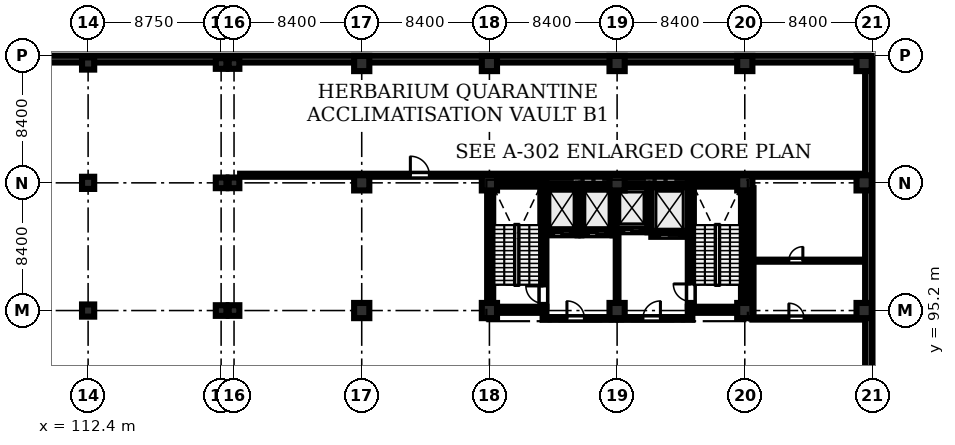
"""IFC4 building model, lengths in metres.
Left out: names, types, materials, properties, quantities, classifications, styles, units other than length and angle.
Written with IfcOpenShell. Run it as: python <this file> out.ifc"""

import sys

from ifc_helpers import new_model, si_unit, direction, frame, frame_2d, origin, origin_2d, place, context, subcontext, project, spatial, rectangle, extrude, element, fill, save


model = new_model("IFC4")
c1 = context("Model", 3, precision=1e-05, world=origin(), true_north=direction((0.0, 1.0)))
c2 = subcontext(c1, "Body", "Model", "MODEL_VIEW")
j1 = project(units=[si_unit("LENGTHUNIT", "METRE"), si_unit("PLANEANGLEUNIT", "RADIAN")], contexts=[c1])
p1 = place(None, origin())
s1 = spatial("IfcSite", under=j1, at=p1, CompositionType="ELEMENT")
p2 = place(p1, origin())
s2 = spatial("IfcBuilding", under=s1, at=p2, CompositionType="ELEMENT")
p3 = place(p2, frame((0.0, 0.0, -4.8)))
s3 = spatial("IfcBuildingStorey", under=s2, at=p3, CompositionType="ELEMENT", Elevation=-4.8)
for number, where, z_axis, x_axis in (
    (1, (112.4, 95.2, 0.0), (0.0, 0.0, 1.0), (1.0, 0.0, 0.0)),
    (2, (112.4, 103.6, 0.0), (0.0, 0.0, 1.0), (1.0, 0.0, 0.0)),
    (3, (112.4, 111.45, 0.0), (0.0, 0.0, 1.0), (1.0, 0.0, 0.0)),
):
    element("IfcColumn", number, at=place(p3, frame(where, z_axis=z_axis, x_axis=x_axis)), inside=s3, PredefinedType="COLUMN", context=c2, shape_type="SweptSolid", body=[
        extrude(rectangle(XDim=0.8, YDim=0.8, at=origin_2d()), origin(), (0.0, 0.0, 1.0), 4.395),
    ])
for number, where, z_axis, x_axis in (
    (4, (121.15, 95.2, 0.0), (0.0, 0.0, 1.0), (1.0, 0.0, 0.0)),
    (5, (121.15, 103.6, 0.0), (0.0, 0.0, 1.0), (1.0, 0.0, 0.0)),
    (6, (121.15, 111.45, 0.0), (0.0, 0.0, 1.0), (1.0, 0.0, 0.0)),
    (7, (122.0, 95.2, 0.0), (0.0, 0.0, 1.0), (1.0, 0.0, 0.0)),
    (8, (122.0, 103.6, 0.0), (0.0, 0.0, 1.0), (1.0, 0.0, 0.0)),
    (9, (122.0, 111.45, 0.0), (0.0, 0.0, 1.0), (1.0, 0.0, 0.0)),
):
    element("IfcColumn", number, at=place(p3, frame(where, z_axis=z_axis, x_axis=x_axis)), inside=s3, PredefinedType="COLUMN", context=c2, shape_type="SweptSolid", body=[
        extrude(rectangle(XDim=0.7, YDim=0.7, at=origin_2d()), origin(), (0.0, 0.0, 1.0), 4.395),
    ])
for number, where, z_axis, x_axis in (
    (10, (130.4, 95.2, 0.0), (0.0, 0.0, 1.0), (1.0, 0.0, 0.0)),
    (11, (130.4, 103.6, 0.0), (0.0, 0.0, 1.0), (1.0, 0.0, 0.0)),
    (12, (130.4, 111.45, 0.0), (0.0, 0.0, 1.0), (1.0, 0.0, 0.0)),
    (13, (138.8, 95.2, 0.0), (0.0, 0.0, 1.0), (1.0, 0.0, 0.0)),
    (14, (138.8, 103.6, 0.0), (0.0, 0.0, 1.0), (1.0, 0.0, 0.0)),
    (15, (138.8, 111.45, 0.0), (0.0, 0.0, 1.0), (1.0, 0.0, 0.0)),
    (16, (147.2, 95.2, 0.0), (0.0, 0.0, 1.0), (1.0, 0.0, 0.0)),
    (17, (147.2, 103.6, 0.0), (0.0, 0.0, 1.0), (1.0, 0.0, 0.0)),
    (18, (147.2, 111.45, 0.0), (0.0, 0.0, 1.0), (1.0, 0.0, 0.0)),
    (19, (155.6, 95.2, 0.0), (0.0, 0.0, 1.0), (1.0, 0.0, 0.0)),
    (20, (155.6, 103.6, 0.0), (0.0, 0.0, 1.0), (1.0, 0.0, 0.0)),
    (21, (155.6, 111.45, 0.0), (0.0, 0.0, 1.0), (1.0, 0.0, 0.0)),
    (22, (163.45, 95.2, 0.0), (0.0, 0.0, 1.0), (1.0, 0.0, 0.0)),
    (23, (163.45, 103.6, 0.0), (0.0, 0.0, 1.0), (1.0, 0.0, 0.0)),
    (24, (163.45, 111.45, 0.0), (0.0, 0.0, 1.0), (1.0, 0.0, 0.0)),
):
    element("IfcColumn", number, at=place(p3, frame(where, z_axis=z_axis, x_axis=x_axis)), inside=s3, PredefinedType="COLUMN", context=c2, shape_type="SweptSolid", body=[
        extrude(rectangle(XDim=1.0, YDim=1.0, at=origin_2d()), origin(), (0.0, 0.0, 1.0), 4.395),
    ])
p4 = place(p3, frame((163.74, 0.26, 0.0), z_axis=(0.0, 0.0, 1.0), x_axis=(0.0, 1.0, 0.0)))
e25 = element("IfcWall", 25, at=p4, inside=s3, PredefinedType="SHEAR", context=c2, shape_type="SweptSolid", body=[
    extrude(rectangle(XDim=111.48, YDim=0.45, at=frame_2d((55.74, 0.0))), origin(), (0.0, 0.0, 1.0), 3.75),
])
p5 = place(p3, frame((163.74, 111.74, 0.0), z_axis=(0.0, 0.0, 1.0), x_axis=(-1.0, 0.0, 0.0)))
e26 = element("IfcWall", 26, at=p5, inside=s3, PredefinedType="SHEAR", context=c2, shape_type="SweptSolid", body=[
    extrude(rectangle(XDim=163.48, YDim=0.45, at=frame_2d((81.74, 0.0))), origin(), (0.0, 0.0, 1.0), 3.75),
])
for number, where, z_axis, x_axis in (
    (27, (138.65, 95.25, 0.0), (0.0, 0.0, 1.0), (1.0, 0.0, 0.0)),
    (28, (138.65, 103.55, 0.0), (0.0, 0.0, 1.0), (1.0, 0.0, 0.0)),
):
    element("IfcWall", number, at=place(p3, frame(where, z_axis=z_axis, x_axis=x_axis)), inside=s3, PredefinedType="SHEAR", context=c2, shape_type="SweptSolid", body=[
        extrude(rectangle(XDim=3.9, YDim=0.4, at=frame_2d((1.95, 0.0))), origin(), (0.0, 0.0, 1.0), 4.395),
    ])
p6 = place(p3, frame((138.85, 95.45, 0.0), z_axis=(0.0, 0.0, 1.0), x_axis=(0.0, 1.0, 0.0)))
e29 = element("IfcWall", 29, at=p6, inside=s3, PredefinedType="SHEAR", context=c2, shape_type="SweptSolid", body=[
    extrude(rectangle(XDim=7.9, YDim=0.4, at=frame_2d((3.95, 0.0))), origin(), (0.0, 0.0, 1.0), 4.395),
])
p7 = place(p3, frame((142.35, 95.45, 0.0), z_axis=(0.0, 0.0, 1.0), x_axis=(0.0, 1.0, 0.0)))
e30 = element("IfcWall", 30, at=p7, inside=s3, PredefinedType="SHEAR", context=c2, shape_type="SweptSolid", body=[
    extrude(rectangle(XDim=7.9, YDim=0.4, at=frame_2d((3.95, 0.0))), origin(), (0.0, 0.0, 1.0), 4.395),
])
p8 = place(p7, frame((0.22, 0.0, 0.0)))
e31 = element("IfcOpeningElement", 31, at=p8, cuts=e30, PredefinedType="OPENING", context=c2, shape_type="SweptSolid", body=[
    extrude(rectangle(XDim=1.15, YDim=2.15, at=frame_2d((0.575, 1.075))), frame((0.0, 0.21, 0.0), z_axis=(0.0, -1.0, 0.0), x_axis=(1.0, 0.0, 0.0)), (0.0, 0.0, 1.0), 0.42),
])
for number, where, z_axis, x_axis in (
    (32, (151.85, 95.25, 0.0), (0.0, 0.0, 1.0), (1.0, 0.0, 0.0)),
    (33, (151.85, 103.55, 0.0), (0.0, 0.0, 1.0), (1.0, 0.0, 0.0)),
):
    element("IfcWall", number, at=place(p3, frame(where, z_axis=z_axis, x_axis=x_axis)), inside=s3, PredefinedType="SHEAR", context=c2, shape_type="SweptSolid", body=[
        extrude(rectangle(XDim=3.9, YDim=0.4, at=frame_2d((1.95, 0.0))), origin(), (0.0, 0.0, 1.0), 4.395),
    ])
p9 = place(p3, frame((152.05, 95.45, 0.0), z_axis=(0.0, 0.0, 1.0), x_axis=(0.0, 1.0, 0.0)))
e34 = element("IfcWall", 34, at=p9, inside=s3, PredefinedType="SHEAR", context=c2, shape_type="SweptSolid", body=[
    extrude(rectangle(XDim=7.9, YDim=0.4, at=frame_2d((3.95, 0.0))), origin(), (0.0, 0.0, 1.0), 4.395),
])
p10 = place(p9, frame((0.35, 0.0, 0.0)))
e35 = element("IfcOpeningElement", 35, at=p10, cuts=e34, PredefinedType="OPENING", context=c2, shape_type="SweptSolid", body=[
    extrude(rectangle(XDim=1.15, YDim=2.15, at=frame_2d((0.575, 1.075))), frame((0.0, 0.21, 0.0), z_axis=(0.0, -1.0, 0.0), x_axis=(1.0, 0.0, 0.0)), (0.0, 0.0, 1.0), 0.42),
])
p11 = place(p3, frame((155.55, 95.45, 0.0), z_axis=(0.0, 0.0, 1.0), x_axis=(0.0, 1.0, 0.0)))
e36 = element("IfcWall", 36, at=p11, inside=s3, PredefinedType="SHEAR", context=c2, shape_type="SweptSolid", body=[
    extrude(rectangle(XDim=7.9, YDim=0.4, at=frame_2d((3.95, 0.0))), origin(), (0.0, 0.0, 1.0), 4.395),
])
p12 = place(p3, frame((142.55, 100.275, 0.0), z_axis=(0.0, 0.0, 1.0), x_axis=(1.0, 0.0, 0.0)))
e37 = element("IfcWall", 37, at=p12, inside=s3, PredefinedType="SHEAR", context=c2, shape_type="SweptSolid", body=[
    extrude(rectangle(XDim=2.05, YDim=0.25, at=frame_2d((1.025, 0.0))), origin(), (0.0, 0.0, 1.0), 4.395),
])
p13 = place(p12, frame((0.475, 0.0, 0.0)))
e38 = element("IfcOpeningElement", 38, at=p13, cuts=e37, PredefinedType="OPENING", context=c2, shape_type="SweptSolid", body=[
    extrude(rectangle(XDim=1.1, YDim=2.15, at=frame_2d((0.55, 1.075))), frame((0.0, 0.135, 0.0), z_axis=(0.0, -1.0, 0.0), x_axis=(1.0, 0.0, 0.0)), (0.0, 0.0, 1.0), 0.27),
])
p14 = place(p3, frame((142.55, 103.425, 0.0), z_axis=(0.0, 0.0, 1.0), x_axis=(1.0, 0.0, 0.0)))
e39 = element("IfcWall", 39, at=p14, inside=s3, PredefinedType="SHEAR", context=c2, shape_type="SweptSolid", body=[
    extrude(rectangle(XDim=2.05, YDim=0.25, at=frame_2d((1.025, 0.0))), origin(), (0.0, 0.0, 1.0), 4.395),
])
p15 = place(p3, frame((144.725, 100.15, 0.0), z_axis=(0.0, 0.0, 1.0), x_axis=(0.0, 1.0, 0.0)))
e40 = element("IfcWall", 40, at=p15, inside=s3, PredefinedType="SHEAR", context=c2, shape_type="SweptSolid", body=[
    extrude(rectangle(XDim=3.4, YDim=0.25, at=frame_2d((1.7, 0.0))), origin(), (0.0, 0.0, 1.0), 4.395),
])
p16 = place(p3, frame((144.85, 100.275, 0.0), z_axis=(0.0, 0.0, 1.0), x_axis=(1.0, 0.0, 0.0)))
e41 = element("IfcWall", 41, at=p16, inside=s3, PredefinedType="SHEAR", context=c2, shape_type="SweptSolid", body=[
    extrude(rectangle(XDim=2.05, YDim=0.25, at=frame_2d((1.025, 0.0))), origin(), (0.0, 0.0, 1.0), 4.395),
])
p17 = place(p16, frame((0.465, 0.0, 0.0)))
e42 = element("IfcOpeningElement", 42, at=p17, cuts=e41, PredefinedType="OPENING", context=c2, shape_type="SweptSolid", body=[
    extrude(rectangle(XDim=1.12, YDim=2.15, at=frame_2d((0.56, 1.075))), frame((0.0, 0.135, 0.0), z_axis=(0.0, -1.0, 0.0), x_axis=(1.0, 0.0, 0.0)), (0.0, 0.0, 1.0), 0.27),
])
p18 = place(p3, frame((144.85, 103.425, 0.0), z_axis=(0.0, 0.0, 1.0), x_axis=(1.0, 0.0, 0.0)))
e43 = element("IfcWall", 43, at=p18, inside=s3, PredefinedType="SHEAR", context=c2, shape_type="SweptSolid", body=[
    extrude(rectangle(XDim=2.05, YDim=0.25, at=frame_2d((1.025, 0.0))), origin(), (0.0, 0.0, 1.0), 4.395),
])
p19 = place(p3, frame((147.025, 100.15, 0.0), z_axis=(0.0, 0.0, 1.0), x_axis=(0.0, 1.0, 0.0)))
e44 = element("IfcWall", 44, at=p19, inside=s3, PredefinedType="SHEAR", context=c2, shape_type="SweptSolid", body=[
    extrude(rectangle(XDim=3.4, YDim=0.25, at=frame_2d((1.7, 0.0))), origin(), (0.0, 0.0, 1.0), 4.395),
])
p20 = place(p3, frame((147.15, 100.475, 0.0), z_axis=(0.0, 0.0, 1.0), x_axis=(1.0, 0.0, 0.0)))
e45 = element("IfcWall", 45, at=p20, inside=s3, PredefinedType="SHEAR", context=c2, shape_type="SweptSolid", body=[
    extrude(rectangle(XDim=2.05, YDim=0.25, at=frame_2d((1.025, 0.0))), origin(), (0.0, 0.0, 1.0), 4.395),
])
p21 = place(p20, frame((0.495, 0.0, 0.0)))
e46 = element("IfcOpeningElement", 46, at=p21, cuts=e45, PredefinedType="OPENING", context=c2, shape_type="SweptSolid", body=[
    extrude(rectangle(XDim=1.06, YDim=2.15, at=frame_2d((0.53, 1.075))), frame((0.0, 0.135, 0.0), z_axis=(0.0, -1.0, 0.0), x_axis=(1.0, 0.0, 0.0)), (0.0, 0.0, 1.0), 0.27),
])
p22 = place(p3, frame((147.15, 103.425, 0.0), z_axis=(0.0, 0.0, 1.0), x_axis=(1.0, 0.0, 0.0)))
e47 = element("IfcWall", 47, at=p22, inside=s3, PredefinedType="SHEAR", context=c2, shape_type="SweptSolid", body=[
    extrude(rectangle(XDim=2.05, YDim=0.25, at=frame_2d((1.025, 0.0))), origin(), (0.0, 0.0, 1.0), 4.395),
])
p23 = place(p3, frame((149.325, 100.35, 0.0), z_axis=(0.0, 0.0, 1.0), x_axis=(0.0, 1.0, 0.0)))
e48 = element("IfcWall", 48, at=p23, inside=s3, PredefinedType="SHEAR", context=c2, shape_type="SweptSolid", body=[
    extrude(rectangle(XDim=3.2, YDim=0.25, at=frame_2d((1.6, 0.0))), origin(), (0.0, 0.0, 1.0), 4.395),
])
p24 = place(p3, frame((149.45, 100.175, 0.0), z_axis=(0.0, 0.0, 1.0), x_axis=(1.0, 0.0, 0.0)))
e49 = element("IfcWall", 49, at=p24, inside=s3, PredefinedType="SHEAR", context=c2, shape_type="SweptSolid", body=[
    extrude(rectangle(XDim=2.4, YDim=0.25, at=frame_2d((1.2, 0.0))), origin(), (0.0, 0.0, 1.0), 4.395),
])
p25 = place(p24, frame((0.55, 0.0, 0.0)))
e50 = element("IfcOpeningElement", 50, at=p25, cuts=e49, PredefinedType="OPENING", context=c2, shape_type="SweptSolid", body=[
    extrude(rectangle(XDim=1.3, YDim=2.25, at=frame_2d((0.65, 1.125))), frame((0.0, 0.135, 0.0), z_axis=(0.0, -1.0, 0.0), x_axis=(1.0, 0.0, 0.0)), (0.0, 0.0, 1.0), 0.27),
])
p26 = place(p3, frame((149.45, 103.425, 0.0), z_axis=(0.0, 0.0, 1.0), x_axis=(1.0, 0.0, 0.0)))
e51 = element("IfcWall", 51, at=p26, inside=s3, PredefinedType="SHEAR", context=c2, shape_type="SweptSolid", body=[
    extrude(rectangle(XDim=2.4, YDim=0.25, at=frame_2d((1.2, 0.0))), origin(), (0.0, 0.0, 1.0), 4.395),
])
p27 = place(p3, frame((142.3, 94.68, 0.0), z_axis=(0.0, 0.0, 1.0), x_axis=(1.0, 0.0, 0.0)))
e52 = element("IfcWall", 52, at=p27, inside=s3, PredefinedType="STANDARD", context=c2, shape_type="SweptSolid", body=[
    extrude(rectangle(XDim=4.8, YDim=0.18, at=frame_2d((2.4, 0.0))), origin(), (0.0, 0.0, 1.0), 4.395),
])
p28 = place(p27, frame((1.6, 0.0, 0.0)))
e53 = element("IfcOpeningElement", 53, at=p28, cuts=e52, PredefinedType="OPENING", context=c2, shape_type="SweptSolid", body=[
    extrude(rectangle(XDim=1.15, YDim=2.15, at=frame_2d((0.575, 1.075))), frame((0.0, 0.1, 0.0), z_axis=(0.0, -1.0, 0.0), x_axis=(1.0, 0.0, 0.0)), (0.0, 0.0, 1.0), 0.2),
])
p29 = place(p3, frame((147.3, 94.68, 0.0), z_axis=(0.0, 0.0, 1.0), x_axis=(1.0, 0.0, 0.0)))
e54 = element("IfcWall", 54, at=p29, inside=s3, PredefinedType="STANDARD", context=c2, shape_type="SweptSolid", body=[
    extrude(rectangle(XDim=4.85, YDim=0.18, at=frame_2d((2.425, 0.0))), origin(), (0.0, 0.0, 1.0), 4.395),
])
p30 = place(p29, frame((1.6, 0.0, 0.0)))
e55 = element("IfcOpeningElement", 55, at=p30, cuts=e54, PredefinedType="OPENING", context=c2, shape_type="SweptSolid", body=[
    extrude(rectangle(XDim=1.15, YDim=2.15, at=frame_2d((0.575, 1.075))), frame((0.0, 0.1, 0.0), z_axis=(0.0, -1.0, 0.0), x_axis=(1.0, 0.0, 0.0)), (0.0, 0.0, 1.0), 0.2),
])
p31 = place(p3, frame((147.2, 95.75, 0.0), z_axis=(0.0, 0.0, 1.0), x_axis=(0.0, 1.0, 0.0)))
e56 = element("IfcWall", 56, at=p31, inside=s3, PredefinedType="STANDARD", context=c2, shape_type="SweptSolid", body=[
    extrude(rectangle(XDim=4.5, YDim=0.18, at=frame_2d((2.25, 0.0))), origin(), (0.0, 0.0, 1.0), 3.595),
])
p32 = place(p3, frame((156.1, 94.68, 0.0), z_axis=(0.0, 0.0, 1.0), x_axis=(1.0, 0.0, 0.0)))
e57 = element("IfcWall", 57, at=p32, inside=s3, PredefinedType="PARTITIONING", context=c2, shape_type="SweptSolid", body=[
    extrude(rectangle(XDim=7.35, YDim=0.15, at=frame_2d((3.675, 0.0))), origin(), (0.0, 0.0, 1.0), 4.395),
])
p33 = place(p32, frame((2.4, 0.0, 0.0)))
e58 = element("IfcOpeningElement", 58, at=p33, cuts=e57, PredefinedType="OPENING", context=c2, shape_type="SweptSolid", body=[
    extrude(rectangle(XDim=1.0, YDim=2.12, at=frame_2d((0.5, 1.06))), frame((0.0, 0.085, 0.0), z_axis=(0.0, -1.0, 0.0), x_axis=(1.0, 0.0, 0.0)), (0.0, 0.0, 1.0), 0.17),
])
p34 = place(p3, frame((156.1, 98.48, 0.0), z_axis=(0.0, 0.0, 1.0), x_axis=(1.0, 0.0, 0.0)))
e59 = element("IfcWall", 59, at=p34, inside=s3, PredefinedType="PARTITIONING", context=c2, shape_type="SweptSolid", body=[
    extrude(rectangle(XDim=7.35, YDim=0.135, at=frame_2d((3.675, 0.0))), origin(), (0.0, 0.0, 1.0), 4.395),
])
p35 = place(p34, frame((2.4, 0.0, 0.0)))
e60 = element("IfcOpeningElement", 60, at=p35, cuts=e59, PredefinedType="OPENING", context=c2, shape_type="SweptSolid", body=[
    extrude(rectangle(XDim=0.92, YDim=2.1, at=frame_2d((0.46, 1.05))), frame((0.0, 0.077, 0.0), z_axis=(0.0, -1.0, 0.0), x_axis=(1.0, 0.0, 0.0)), (0.0, 0.0, 1.0), 0.155),
])
p36 = place(p3, frame((156.1, 94.68, 0.0), z_axis=(0.0, 0.0, 1.0), x_axis=(0.0, 1.0, 0.0)))
e61 = element("IfcWall", 61, at=p36, inside=s3, PredefinedType="PARTITIONING", context=c2, shape_type="SweptSolid", body=[
    extrude(rectangle(XDim=8.57, YDim=0.15, at=frame_2d((4.285, 0.0))), origin(), (0.0, 0.0, 1.0), 4.395),
])
p37 = place(p3, frame((122.4, 104.1, 0.0), z_axis=(0.0, 0.0, 1.0), x_axis=(1.0, 0.0, 0.0)))
e62 = element("IfcWall", 62, at=p37, inside=s3, PredefinedType="SOLIDWALL", context=c2, shape_type="SweptSolid", body=[
    extrude(rectangle(XDim=40.8, YDim=0.2, at=frame_2d((20.4, 0.0))), origin(), (0.0, 0.0, 1.0), 4.395),
])
p38 = place(p37, frame((11.2, 0.0, 0.0)))
e63 = element("IfcOpeningElement", 63, at=p38, cuts=e62, PredefinedType="OPENING", context=c2, shape_type="SweptSolid", body=[
    extrude(rectangle(XDim=1.25, YDim=2.2, at=frame_2d((0.625, 1.1))), frame((0.0, 0.11, 0.0), z_axis=(0.0, -1.0, 0.0), x_axis=(1.0, 0.0, 0.0)), (0.0, 0.0, 1.0), 0.22),
])
p39 = place(p28, origin())
e64 = element("IfcDoor", 64, at=p39, inside=s3, OperationType="SINGLE_SWING_LEFT", PredefinedType="DOOR", context=c2, shape_type="SweptSolid", body=[
    extrude(rectangle(XDim=1.15, YDim=2.15, at=frame_2d((0.575, 1.075))), frame((0.0, 0.025, 0.0), z_axis=(0.0, -1.0, 0.0), x_axis=(1.0, 0.0, 0.0)), (0.0, 0.0, 1.0), 0.05),
])
fill(e53, e64)
p40 = place(p30, origin())
e65 = element("IfcDoor", 65, at=p40, inside=s3, OperationType="SINGLE_SWING_RIGHT", PredefinedType="DOOR", context=c2, shape_type="SweptSolid", body=[
    extrude(rectangle(XDim=1.15, YDim=2.15, at=frame_2d((0.575, 1.075))), frame((0.0, 0.025, 0.0), z_axis=(0.0, -1.0, 0.0), x_axis=(1.0, 0.0, 0.0)), (0.0, 0.0, 1.0), 0.05),
])
fill(e55, e65)
p41 = place(p33, origin())
e66 = element("IfcDoor", 66, at=p41, inside=s3, OperationType="SINGLE_SWING_LEFT", PredefinedType="DOOR", context=c2, shape_type="SweptSolid", body=[
    extrude(rectangle(XDim=1.0, YDim=2.12, at=frame_2d((0.5, 1.06))), frame((0.0, 0.025, 0.0), z_axis=(0.0, -1.0, 0.0), x_axis=(1.0, 0.0, 0.0)), (0.0, 0.0, 1.0), 0.05),
])
fill(e58, e66)
p42 = place(p35, origin())
e67 = element("IfcDoor", 67, at=p42, inside=s3, OperationType="SINGLE_SWING_RIGHT", PredefinedType="DOOR", context=c2, shape_type="SweptSolid", body=[
    extrude(rectangle(XDim=0.92, YDim=2.1, at=frame_2d((0.46, 1.05))), frame((0.0, 0.025, 0.0), z_axis=(0.0, -1.0, 0.0), x_axis=(1.0, 0.0, 0.0)), (0.0, 0.0, 1.0), 0.05),
])
fill(e60, e67)
p43 = place(p38, origin())
e68 = element("IfcDoor", 68, at=p43, inside=s3, OperationType="SINGLE_SWING_LEFT", PredefinedType="DOOR", context=c2, shape_type="SweptSolid", body=[
    extrude(rectangle(XDim=1.25, YDim=2.2, at=frame_2d((0.625, 1.1))), frame((0.0, 0.025, 0.0), z_axis=(0.0, -1.0, 0.0), x_axis=(1.0, 0.0, 0.0)), (0.0, 0.0, 1.0), 0.05),
])
fill(e63, e68)
p44 = place(p8, origin())
e69 = element("IfcDoor", 69, at=p44, inside=s3, OperationType="SINGLE_SWING_RIGHT", PredefinedType="DOOR", context=c2, shape_type="SweptSolid", body=[
    extrude(rectangle(XDim=1.15, YDim=2.15, at=frame_2d((0.575, 1.075))), frame((0.0, 0.025, 0.0), z_axis=(0.0, -1.0, 0.0), x_axis=(1.0, 0.0, 0.0)), (0.0, 0.0, 1.0), 0.05),
])
fill(e31, e69)
p45 = place(p10, origin())
e70 = element("IfcDoor", 70, at=p45, inside=s3, OperationType="SINGLE_SWING_RIGHT", PredefinedType="DOOR", context=c2, shape_type="SweptSolid", body=[
    extrude(rectangle(XDim=1.15, YDim=2.15, at=frame_2d((0.575, 1.075))), frame((0.0, 0.025, 0.0), z_axis=(0.0, -1.0, 0.0), x_axis=(1.0, 0.0, 0.0)), (0.0, 0.0, 1.0), 0.05),
])
fill(e35, e70)
p46 = place(p13, origin())
e71 = element("IfcDoor", 71, at=p46, inside=s3, OperationType="SLIDING_TO_LEFT", PredefinedType="DOOR", context=c2, shape_type="SweptSolid", body=[
    extrude(rectangle(XDim=1.1, YDim=2.15, at=frame_2d((0.55, 1.075))), frame((0.0, 0.025, 0.0), z_axis=(0.0, -1.0, 0.0), x_axis=(1.0, 0.0, 0.0)), (0.0, 0.0, 1.0), 0.05),
])
fill(e38, e71)
p47 = place(p17, origin())
e72 = element("IfcDoor", 72, at=p47, inside=s3, OperationType="SLIDING_TO_LEFT", PredefinedType="DOOR", context=c2, shape_type="SweptSolid", body=[
    extrude(rectangle(XDim=1.12, YDim=2.15, at=frame_2d((0.56, 1.075))), frame((0.0, 0.025, 0.0), z_axis=(0.0, -1.0, 0.0), x_axis=(1.0, 0.0, 0.0)), (0.0, 0.0, 1.0), 0.05),
])
fill(e42, e72)
p48 = place(p21, origin())
e73 = element("IfcDoor", 73, at=p48, inside=s3, OperationType="SLIDING_TO_LEFT", PredefinedType="DOOR", context=c2, shape_type="SweptSolid", body=[
    extrude(rectangle(XDim=1.06, YDim=2.15, at=frame_2d((0.53, 1.075))), frame((0.0, 0.025, 0.0), z_axis=(0.0, -1.0, 0.0), x_axis=(1.0, 0.0, 0.0)), (0.0, 0.0, 1.0), 0.05),
])
fill(e46, e73)
p49 = place(p25, origin())
e74 = element("IfcDoor", 74, at=p49, inside=s3, OperationType="SLIDING_TO_LEFT", PredefinedType="DOOR", context=c2, shape_type="SweptSolid", body=[
    extrude(rectangle(XDim=1.3, YDim=2.25, at=frame_2d((0.65, 1.125))), frame((0.0, 0.025, 0.0), z_axis=(0.0, -1.0, 0.0), x_axis=(1.0, 0.0, 0.0)), (0.0, 0.0, 1.0), 0.05),
])
fill(e50, e74)
save(model, sys.argv[1])
